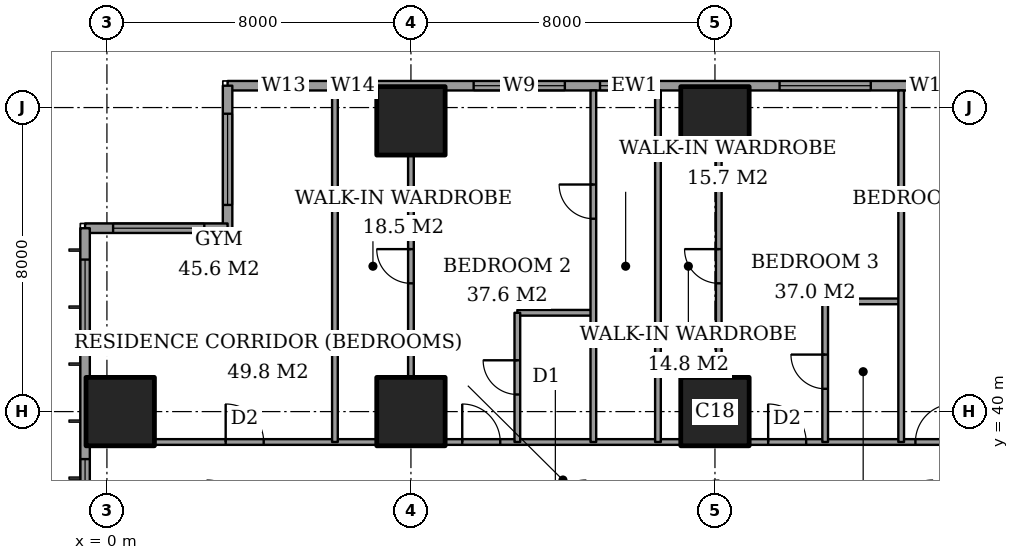
"""IFC4 building model, lengths in metres.
Left out: names, types, materials, properties, quantities, classifications, styles, units other than length and angle.
Written with IfcOpenShell. Run it as: python <this file> out.ifc"""

import sys

from ifc_helpers import new_model, si_unit, direction, frame, frame_2d, origin, origin_2d, place, context, subcontext, project, spatial, rectangle, extrude, element, fill, save


model = new_model("IFC4")
c1 = context("Model", 3, precision=1e-05, world=origin(), true_north=direction((0.0, 1.0)))
c2 = subcontext(c1, "Body", "Model", "MODEL_VIEW")
j1 = project(units=[si_unit("LENGTHUNIT", "METRE"), si_unit("PLANEANGLEUNIT", "RADIAN")], contexts=[c1])
p1 = place(None, origin())
s1 = spatial("IfcSite", under=j1, at=p1, CompositionType="ELEMENT")
p2 = place(p1, origin())
s2 = spatial("IfcBuilding", under=s1, at=p2, CompositionType="ELEMENT")
p3 = place(p2, frame((0.0, 0.0, 207.4)))
s3 = spatial("IfcBuildingStorey", under=s2, at=p3, CompositionType="ELEMENT", Elevation=207.4)
for number, where, z_axis, x_axis in (
    (1, (0.35, 40.0, 0.0), (0.0, 0.0, 1.0), (1.0, 0.0, 0.0)),
    (2, (8.0, 40.0, 0.0), (0.0, 0.0, 1.0), (1.0, 0.0, 0.0)),
    (3, (8.0, 47.65, 0.0), (0.0, 0.0, 1.0), (1.0, 0.0, 0.0)),
    (4, (16.0, 40.0, 0.0), (0.0, 0.0, 1.0), (1.0, 0.0, 0.0)),
    (5, (16.0, 47.65, 0.0), (0.0, 0.0, 1.0), (1.0, 0.0, 0.0)),
):
    element("IfcColumn", number, at=place(p3, frame(where, z_axis=z_axis, x_axis=x_axis)), inside=s3, PredefinedType="COLUMN", context=c2, shape_type="SweptSolid", body=[
        extrude(rectangle(XDim=1.8, YDim=1.8, at=origin_2d()), origin(), (0.0, 0.0, 1.0), 3.6),
    ])
p4 = place(p3, frame((24.575, 48.575, 0.0), z_axis=(0.0, 0.0, 1.0), x_axis=(-1.0, 0.0, 0.0)))
e6 = element("IfcWall", 6, at=p4, inside=s3, PredefinedType="SOLIDWALL", context=c2, shape_type="SweptSolid", body=[
    extrude(rectangle(XDim=21.4, YDim=0.25, at=frame_2d((10.7, 0.0))), origin(), (0.0, 0.0, 1.0), 3.6),
])
p5 = place(p4, frame((2.275, 0.0, 0.2)))
e7 = element("IfcOpeningElement", 7, at=p5, cuts=e6, PredefinedType="OPENING", context=c2, shape_type="SweptSolid", body=[
    extrude(rectangle(XDim=1.2, YDim=2.4, at=frame_2d((0.6, 1.2))), frame((0.0, 0.135, 0.0), z_axis=(0.0, -1.0, 0.0), x_axis=(1.0, 0.0, 0.0)), (0.0, 0.0, 1.0), 0.27),
])
p6 = place(p4, frame((4.475, 0.0, 0.2)))
e8 = element("IfcOpeningElement", 8, at=p6, cuts=e6, PredefinedType="OPENING", context=c2, shape_type="SweptSolid", body=[
    extrude(rectangle(XDim=2.4, YDim=2.4, at=frame_2d((1.2, 1.2))), frame((0.0, 0.135, 0.0), z_axis=(0.0, -1.0, 0.0), x_axis=(1.0, 0.0, 0.0)), (0.0, 0.0, 1.0), 0.27),
])
p7 = place(p4, frame((10.4, 0.0, 0.2)))
e9 = element("IfcOpeningElement", 9, at=p7, cuts=e6, PredefinedType="OPENING", context=c2, shape_type="SweptSolid", body=[
    extrude(rectangle(XDim=1.2, YDim=2.4, at=frame_2d((0.6, 1.2))), frame((0.0, 0.135, 0.0), z_axis=(0.0, -1.0, 0.0), x_axis=(1.0, 0.0, 0.0)), (0.0, 0.0, 1.0), 0.27),
])
p8 = place(p4, frame((12.525, 0.0, 0.2)))
e10 = element("IfcOpeningElement", 10, at=p8, cuts=e6, PredefinedType="OPENING", context=c2, shape_type="SweptSolid", body=[
    extrude(rectangle(XDim=2.4, YDim=2.4, at=frame_2d((1.2, 1.2))), frame((0.0, 0.135, 0.0), z_axis=(0.0, -1.0, 0.0), x_axis=(1.0, 0.0, 0.0)), (0.0, 0.0, 1.0), 0.27),
])
p9 = place(p4, frame((17.8, 0.0, 0.2)))
e11 = element("IfcOpeningElement", 11, at=p9, cuts=e6, PredefinedType="OPENING", context=c2, shape_type="SweptSolid", body=[
    extrude(rectangle(XDim=0.6, YDim=2.4, at=frame_2d((0.3, 1.2))), frame((0.0, 0.135, 0.0), z_axis=(0.0, -1.0, 0.0), x_axis=(1.0, 0.0, 0.0)), (0.0, 0.0, 1.0), 0.27),
])
p10 = place(p4, frame((19.325, 0.0, 0.2)))
e12 = element("IfcOpeningElement", 12, at=p10, cuts=e6, PredefinedType="OPENING", context=c2, shape_type="SweptSolid", body=[
    extrude(rectangle(XDim=1.2, YDim=2.4, at=frame_2d((0.6, 1.2))), frame((0.0, 0.135, 0.0), z_axis=(0.0, -1.0, 0.0), x_axis=(1.0, 0.0, 0.0)), (0.0, 0.0, 1.0), 0.27),
])
p11 = place(p3, frame((3.175, 48.575, 0.0), z_axis=(0.0, 0.0, 1.0), x_axis=(0.0, -1.0, 0.0)))
e13 = element("IfcWall", 13, at=p11, inside=s3, PredefinedType="SOLIDWALL", context=c2, shape_type="SweptSolid", body=[
    extrude(rectangle(XDim=3.75, YDim=0.25, at=frame_2d((1.875, 0.0))), origin(), (0.0, 0.0, 1.0), 3.6),
])
p12 = place(p11, frame((0.738, 0.0, 0.2)))
e14 = element("IfcOpeningElement", 14, at=p12, cuts=e13, PredefinedType="OPENING", context=c2, shape_type="SweptSolid", body=[
    extrude(rectangle(XDim=2.4, YDim=2.4, at=frame_2d((1.2, 1.2))), frame((0.0, 0.135, 0.0), z_axis=(0.0, -1.0, 0.0), x_axis=(1.0, 0.0, 0.0)), (0.0, 0.0, 1.0), 0.27),
])
p13 = place(p3, frame((3.175, 44.825, 0.0), z_axis=(0.0, 0.0, 1.0), x_axis=(-1.0, 0.0, 0.0)))
e15 = element("IfcWall", 15, at=p13, inside=s3, PredefinedType="SOLIDWALL", context=c2, shape_type="SweptSolid", body=[
    extrude(rectangle(XDim=3.75, YDim=0.25, at=frame_2d((1.875, 0.0))), origin(), (0.0, 0.0, 1.0), 3.6),
])
p14 = place(p13, frame((0.613, 0.0, 0.2)))
e16 = element("IfcOpeningElement", 16, at=p14, cuts=e15, PredefinedType="OPENING", context=c2, shape_type="SweptSolid", body=[
    extrude(rectangle(XDim=2.4, YDim=2.4, at=frame_2d((1.2, 1.2))), frame((0.0, 0.135, 0.0), z_axis=(0.0, -1.0, 0.0), x_axis=(1.0, 0.0, 0.0)), (0.0, 0.0, 1.0), 0.27),
])
p15 = place(p3, frame((-0.575, 44.825, 0.0), z_axis=(0.0, 0.0, 1.0), x_axis=(0.0, -1.0, 0.0)))
e17 = element("IfcWall", 17, at=p15, inside=s3, PredefinedType="SOLIDWALL", context=c2, shape_type="SweptSolid", body=[
    extrude(rectangle(XDim=41.65, YDim=0.25, at=frame_2d((20.825, 0.0))), origin(), (0.0, 0.0, 1.0), 3.6),
])
p16 = place(p15, frame((0.825, 0.0, 0.2)))
e18 = element("IfcOpeningElement", 18, at=p16, cuts=e17, PredefinedType="OPENING", context=c2, shape_type="SweptSolid", body=[
    extrude(rectangle(XDim=2.4, YDim=2.4, at=frame_2d((1.2, 1.2))), frame((0.0, 0.135, 0.0), z_axis=(0.0, -1.0, 0.0), x_axis=(1.0, 0.0, 0.0)), (0.0, 0.0, 1.0), 0.27),
])
p17 = place(p15, frame((6.075, 0.0, 0.2)))
e19 = element("IfcOpeningElement", 19, at=p17, cuts=e17, PredefinedType="OPENING", context=c2, shape_type="SweptSolid", body=[
    extrude(rectangle(XDim=1.2, YDim=2.4, at=frame_2d((0.6, 1.2))), frame((0.0, 0.135, 0.0), z_axis=(0.0, -1.0, 0.0), x_axis=(1.0, 0.0, 0.0)), (0.0, 0.0, 1.0), 0.27),
])
p18 = place(p15, frame((8.575, 0.0, 0.2)))
e20 = element("IfcOpeningElement", 20, at=p18, cuts=e17, PredefinedType="OPENING", context=c2, shape_type="SweptSolid", body=[
    extrude(rectangle(XDim=2.4, YDim=2.4, at=frame_2d((1.2, 1.2))), frame((0.0, 0.135, 0.0), z_axis=(0.0, -1.0, 0.0), x_axis=(1.0, 0.0, 0.0)), (0.0, 0.0, 1.0), 0.27),
])
p19 = place(p15, frame((15.675, 0.0, 0.2)))
e21 = element("IfcOpeningElement", 21, at=p19, cuts=e17, PredefinedType="OPENING", context=c2, shape_type="SweptSolid", body=[
    extrude(rectangle(XDim=2.4, YDim=2.4, at=frame_2d((1.2, 1.2))), frame((0.0, 0.135, 0.0), z_axis=(0.0, -1.0, 0.0), x_axis=(1.0, 0.0, 0.0)), (0.0, 0.0, 1.0), 0.27),
])
p20 = place(p15, frame((23.575, 0.0, 0.2)))
e22 = element("IfcOpeningElement", 22, at=p20, cuts=e17, PredefinedType="OPENING", context=c2, shape_type="SweptSolid", body=[
    extrude(rectangle(XDim=2.4, YDim=2.4, at=frame_2d((1.2, 1.2))), frame((0.0, 0.135, 0.0), z_axis=(0.0, -1.0, 0.0), x_axis=(1.0, 0.0, 0.0)), (0.0, 0.0, 1.0), 0.27),
])
p21 = place(p15, frame((30.775, 0.0, 0.2)))
e23 = element("IfcOpeningElement", 23, at=p21, cuts=e17, PredefinedType="OPENING", context=c2, shape_type="SweptSolid", body=[
    extrude(rectangle(XDim=2.4, YDim=2.4, at=frame_2d((1.2, 1.2))), frame((0.0, 0.135, 0.0), z_axis=(0.0, -1.0, 0.0), x_axis=(1.0, 0.0, 0.0)), (0.0, 0.0, 1.0), 0.27),
])
p22 = place(p15, frame((34.55, 0.0, 0.2)))
e24 = element("IfcOpeningElement", 24, at=p22, cuts=e17, PredefinedType="OPENING", context=c2, shape_type="SweptSolid", body=[
    extrude(rectangle(XDim=1.2, YDim=2.4, at=frame_2d((0.6, 1.2))), frame((0.0, 0.135, 0.0), z_axis=(0.0, -1.0, 0.0), x_axis=(1.0, 0.0, 0.0)), (0.0, 0.0, 1.0), 0.27),
])
p23 = place(p15, frame((38.425, 0.0, 0.2)))
e25 = element("IfcOpeningElement", 25, at=p23, cuts=e17, PredefinedType="OPENING", context=c2, shape_type="SweptSolid", body=[
    extrude(rectangle(XDim=2.4, YDim=2.4, at=frame_2d((1.2, 1.2))), frame((0.0, 0.135, 0.0), z_axis=(0.0, -1.0, 0.0), x_axis=(1.0, 0.0, 0.0)), (0.0, 0.0, 1.0), 0.27),
])
p24 = place(p3, frame((1.25, 39.2, 0.0), z_axis=(0.0, 0.0, 1.0), x_axis=(1.0, 0.0, 0.0)))
e26 = element("IfcWall", 26, at=p24, inside=s3, PredefinedType="PARTITIONING", context=c2, shape_type="SweptSolid", body=[
    extrude(rectangle(XDim=5.85, YDim=0.15, at=frame_2d((2.925, 0.0))), origin(), (0.0, 0.0, 1.0), 3.35),
])
p25 = place(p24, frame((1.875, 0.0, 0.0)))
e27 = element("IfcOpeningElement", 27, at=p25, cuts=e26, PredefinedType="OPENING", context=c2, shape_type="SweptSolid", body=[
    extrude(rectangle(XDim=1.0, YDim=2.1, at=frame_2d((0.5, 1.05))), frame((0.0, 0.085, 0.0), z_axis=(0.0, -1.0, 0.0), x_axis=(1.0, 0.0, 0.0)), (0.0, 0.0, 1.0), 0.17),
])
p26 = place(p3, frame((8.9, 39.2, 0.0), z_axis=(0.0, 0.0, 1.0), x_axis=(1.0, 0.0, 0.0)))
e28 = element("IfcWall", 28, at=p26, inside=s3, PredefinedType="PARTITIONING", context=c2, shape_type="SweptSolid", body=[
    extrude(rectangle(XDim=6.2, YDim=0.15, at=frame_2d((3.1, 0.0))), origin(), (0.0, 0.0, 1.0), 3.35),
])
p27 = place(p26, frame((0.45, 0.0, 0.0)))
e29 = element("IfcOpeningElement", 29, at=p27, cuts=e28, PredefinedType="OPENING", context=c2, shape_type="SweptSolid", body=[
    extrude(rectangle(XDim=1.0, YDim=2.1, at=frame_2d((0.5, 1.05))), frame((0.0, 0.085, 0.0), z_axis=(0.0, -1.0, 0.0), x_axis=(1.0, 0.0, 0.0)), (0.0, 0.0, 1.0), 0.17),
])
p28 = place(p3, frame((16.9, 39.2, 0.0), z_axis=(0.0, 0.0, 1.0), x_axis=(1.0, 0.0, 0.0)))
e30 = element("IfcWall", 30, at=p28, inside=s3, PredefinedType="PARTITIONING", context=c2, shape_type="SweptSolid", body=[
    extrude(rectangle(XDim=5.75, YDim=0.15, at=frame_2d((2.875, 0.0))), origin(), (0.0, 0.0, 1.0), 3.35),
])
p29 = place(p28, frame((0.5, 0.0, 0.0)))
e31 = element("IfcOpeningElement", 31, at=p29, cuts=e30, PredefinedType="OPENING", context=c2, shape_type="SweptSolid", body=[
    extrude(rectangle(XDim=1.0, YDim=2.1, at=frame_2d((0.5, 1.05))), frame((0.0, 0.085, 0.0), z_axis=(0.0, -1.0, 0.0), x_axis=(1.0, 0.0, 0.0)), (0.0, 0.0, 1.0), 0.17),
])
p30 = place(p28, frame((4.375, 0.0, 0.0)))
e32 = element("IfcOpeningElement", 32, at=p30, cuts=e30, PredefinedType="OPENING", context=c2, shape_type="SweptSolid", body=[
    extrude(rectangle(XDim=1.0, YDim=2.1, at=frame_2d((0.5, 1.05))), frame((0.0, 0.085, 0.0), z_axis=(0.0, -1.0, 0.0), x_axis=(1.0, 0.0, 0.0)), (0.0, 0.0, 1.0), 0.17),
])
for number, where, z_axis, x_axis in (
    (33, (10.8, 42.6, 0.0), (0.0, 0.0, 1.0), (1.0, 0.0, 0.0)),
    (34, (18.9, 42.9, 0.0), (0.0, 0.0, 1.0), (1.0, 0.0, 0.0)),
):
    element("IfcWall", number, at=place(p3, frame(where, z_axis=z_axis, x_axis=x_axis)), inside=s3, PredefinedType="PARTITIONING", context=c2, shape_type="SweptSolid", body=[
        extrude(rectangle(XDim=2.0, YDim=0.15, at=frame_2d((1.0, 0.0))), origin(), (0.0, 0.0, 1.0), 3.35),
    ])
p31 = place(p3, frame((6.0, 39.2, 0.0), z_axis=(0.0, 0.0, 1.0), x_axis=(0.0, 1.0, 0.0)))
e35 = element("IfcWall", 35, at=p31, inside=s3, PredefinedType="PARTITIONING", context=c2, shape_type="SweptSolid", body=[
    extrude(rectangle(XDim=9.25, YDim=0.15, at=frame_2d((4.625, 0.0))), origin(), (0.0, 0.0, 1.0), 3.35),
])
p32 = place(p3, frame((8.0, 40.9, 0.0), z_axis=(0.0, 0.0, 1.0), x_axis=(0.0, 1.0, 0.0)))
e36 = element("IfcWall", 36, at=p32, inside=s3, PredefinedType="PARTITIONING", context=c2, shape_type="SweptSolid", body=[
    extrude(rectangle(XDim=5.85, YDim=0.15, at=frame_2d((2.925, 0.0))), origin(), (0.0, 0.0, 1.0), 3.35),
])
p33 = place(p32, frame((2.475, 0.0, 0.0)))
e37 = element("IfcOpeningElement", 37, at=p33, cuts=e36, PredefinedType="OPENING", context=c2, shape_type="SweptSolid", body=[
    extrude(rectangle(XDim=0.9, YDim=2.1, at=frame_2d((0.45, 1.05))), frame((0.0, 0.085, 0.0), z_axis=(0.0, -1.0, 0.0), x_axis=(1.0, 0.0, 0.0)), (0.0, 0.0, 1.0), 0.17),
])
p34 = place(p3, frame((10.8, 39.2, 0.0), z_axis=(0.0, 0.0, 1.0), x_axis=(0.0, 1.0, 0.0)))
e38 = element("IfcWall", 38, at=p34, inside=s3, PredefinedType="PARTITIONING", context=c2, shape_type="SweptSolid", body=[
    extrude(rectangle(XDim=3.4, YDim=0.15, at=frame_2d((1.7, 0.0))), origin(), (0.0, 0.0, 1.0), 3.35),
])
p35 = place(p34, frame((1.25, 0.0, 0.0)))
e39 = element("IfcOpeningElement", 39, at=p35, cuts=e38, PredefinedType="OPENING", context=c2, shape_type="SweptSolid", body=[
    extrude(rectangle(XDim=0.9, YDim=2.1, at=frame_2d((0.45, 1.05))), frame((0.0, 0.085, 0.0), z_axis=(0.0, -1.0, 0.0), x_axis=(1.0, 0.0, 0.0)), (0.0, 0.0, 1.0), 0.17),
])
p36 = place(p3, frame((12.8, 39.2, 0.0), z_axis=(0.0, 0.0, 1.0), x_axis=(0.0, 1.0, 0.0)))
e40 = element("IfcWall", 40, at=p36, inside=s3, PredefinedType="PARTITIONING", context=c2, shape_type="SweptSolid", body=[
    extrude(rectangle(XDim=9.25, YDim=0.15, at=frame_2d((4.625, 0.0))), origin(), (0.0, 0.0, 1.0), 3.35),
])
p37 = place(p36, frame((5.875, 0.0, 0.0)))
e41 = element("IfcOpeningElement", 41, at=p37, cuts=e40, PredefinedType="OPENING", context=c2, shape_type="SweptSolid", body=[
    extrude(rectangle(XDim=0.9, YDim=2.1, at=frame_2d((0.45, 1.05))), frame((0.0, 0.085, 0.0), z_axis=(0.0, -1.0, 0.0), x_axis=(1.0, 0.0, 0.0)), (0.0, 0.0, 1.0), 0.17),
])
p38 = place(p3, frame((14.5, 39.2, 0.0), z_axis=(0.0, 0.0, 1.0), x_axis=(0.0, 1.0, 0.0)))
e42 = element("IfcWall", 42, at=p38, inside=s3, PredefinedType="PARTITIONING", context=c2, shape_type="SweptSolid", body=[
    extrude(rectangle(XDim=9.25, YDim=0.15, at=frame_2d((4.625, 0.0))), origin(), (0.0, 0.0, 1.0), 3.35),
])
p39 = place(p3, frame((16.1, 40.9, 0.0), z_axis=(0.0, 0.0, 1.0), x_axis=(0.0, 1.0, 0.0)))
e43 = element("IfcWall", 43, at=p39, inside=s3, PredefinedType="PARTITIONING", context=c2, shape_type="SweptSolid", body=[
    extrude(rectangle(XDim=5.85, YDim=0.15, at=frame_2d((2.925, 0.0))), origin(), (0.0, 0.0, 1.0), 3.35),
])
p40 = place(p39, frame((2.475, 0.0, 0.0)))
e44 = element("IfcOpeningElement", 44, at=p40, cuts=e43, PredefinedType="OPENING", context=c2, shape_type="SweptSolid", body=[
    extrude(rectangle(XDim=0.9, YDim=2.1, at=frame_2d((0.45, 1.05))), frame((0.0, 0.085, 0.0), z_axis=(0.0, -1.0, 0.0), x_axis=(1.0, 0.0, 0.0)), (0.0, 0.0, 1.0), 0.17),
])
p41 = place(p3, frame((18.9, 39.2, 0.0), z_axis=(0.0, 0.0, 1.0), x_axis=(0.0, 1.0, 0.0)))
e45 = element("IfcWall", 45, at=p41, inside=s3, PredefinedType="PARTITIONING", context=c2, shape_type="SweptSolid", body=[
    extrude(rectangle(XDim=3.7, YDim=0.15, at=frame_2d((1.85, 0.0))), origin(), (0.0, 0.0, 1.0), 3.35),
])
p42 = place(p41, frame((1.4, 0.0, 0.0)))
e46 = element("IfcOpeningElement", 46, at=p42, cuts=e45, PredefinedType="OPENING", context=c2, shape_type="SweptSolid", body=[
    extrude(rectangle(XDim=0.9, YDim=2.1, at=frame_2d((0.45, 1.05))), frame((0.0, 0.085, 0.0), z_axis=(0.0, -1.0, 0.0), x_axis=(1.0, 0.0, 0.0)), (0.0, 0.0, 1.0), 0.17),
])
p43 = place(p3, frame((20.9, 39.2, 0.0), z_axis=(0.0, 0.0, 1.0), x_axis=(0.0, 1.0, 0.0)))
e47 = element("IfcWall", 47, at=p43, inside=s3, PredefinedType="PARTITIONING", context=c2, shape_type="SweptSolid", body=[
    extrude(rectangle(XDim=9.25, YDim=0.15, at=frame_2d((4.625, 0.0))), origin(), (0.0, 0.0, 1.0), 3.35),
])
p44 = place(p5, origin())
e48 = element("IfcWindow", 48, at=p44, inside=s3, PartitioningType="SINGLE_PANEL", PredefinedType="WINDOW", context=c2, shape_type="SweptSolid", body=[
    extrude(rectangle(XDim=1.2, YDim=2.4, at=frame_2d((0.6, 1.2))), frame((0.0, 0.03, 0.0), z_axis=(0.0, -1.0, 0.0), x_axis=(1.0, 0.0, 0.0)), (0.0, 0.0, 1.0), 0.06),
])
fill(e7, e48)
p45 = place(p6, origin())
e49 = element("IfcWindow", 49, at=p45, inside=s3, PartitioningType="SINGLE_PANEL", PredefinedType="WINDOW", context=c2, shape_type="SweptSolid", body=[
    extrude(rectangle(XDim=2.4, YDim=2.4, at=frame_2d((1.2, 1.2))), frame((0.0, 0.03, 0.0), z_axis=(0.0, -1.0, 0.0), x_axis=(1.0, 0.0, 0.0)), (0.0, 0.0, 1.0), 0.06),
])
fill(e8, e49)
p46 = place(p7, origin())
e50 = element("IfcWindow", 50, at=p46, inside=s3, PartitioningType="SINGLE_PANEL", PredefinedType="WINDOW", context=c2, shape_type="SweptSolid", body=[
    extrude(rectangle(XDim=1.2, YDim=2.4, at=frame_2d((0.6, 1.2))), frame((0.0, 0.03, 0.0), z_axis=(0.0, -1.0, 0.0), x_axis=(1.0, 0.0, 0.0)), (0.0, 0.0, 1.0), 0.06),
])
fill(e9, e50)
p47 = place(p8, origin())
e51 = element("IfcWindow", 51, at=p47, inside=s3, PartitioningType="SINGLE_PANEL", PredefinedType="WINDOW", context=c2, shape_type="SweptSolid", body=[
    extrude(rectangle(XDim=2.4, YDim=2.4, at=frame_2d((1.2, 1.2))), frame((0.0, 0.03, 0.0), z_axis=(0.0, -1.0, 0.0), x_axis=(1.0, 0.0, 0.0)), (0.0, 0.0, 1.0), 0.06),
])
fill(e10, e51)
p48 = place(p9, origin())
e52 = element("IfcWindow", 52, at=p48, inside=s3, PartitioningType="SINGLE_PANEL", PredefinedType="WINDOW", context=c2, shape_type="SweptSolid", body=[
    extrude(rectangle(XDim=0.6, YDim=2.4, at=frame_2d((0.3, 1.2))), frame((0.0, 0.03, 0.0), z_axis=(0.0, -1.0, 0.0), x_axis=(1.0, 0.0, 0.0)), (0.0, 0.0, 1.0), 0.06),
])
fill(e11, e52)
p49 = place(p10, origin())
e53 = element("IfcWindow", 53, at=p49, inside=s3, PartitioningType="SINGLE_PANEL", PredefinedType="WINDOW", context=c2, shape_type="SweptSolid", body=[
    extrude(rectangle(XDim=1.2, YDim=2.4, at=frame_2d((0.6, 1.2))), frame((0.0, 0.03, 0.0), z_axis=(0.0, -1.0, 0.0), x_axis=(1.0, 0.0, 0.0)), (0.0, 0.0, 1.0), 0.06),
])
fill(e12, e53)
p50 = place(p12, origin())
e54 = element("IfcWindow", 54, at=p50, inside=s3, PartitioningType="SINGLE_PANEL", PredefinedType="WINDOW", context=c2, shape_type="SweptSolid", body=[
    extrude(rectangle(XDim=2.4, YDim=2.4, at=frame_2d((1.2, 1.2))), frame((0.0, 0.03, 0.0), z_axis=(0.0, -1.0, 0.0), x_axis=(1.0, 0.0, 0.0)), (0.0, 0.0, 1.0), 0.06),
])
fill(e14, e54)
p51 = place(p14, origin())
e55 = element("IfcWindow", 55, at=p51, inside=s3, PartitioningType="SINGLE_PANEL", PredefinedType="WINDOW", context=c2, shape_type="SweptSolid", body=[
    extrude(rectangle(XDim=2.4, YDim=2.4, at=frame_2d((1.2, 1.2))), frame((0.0, 0.03, 0.0), z_axis=(0.0, -1.0, 0.0), x_axis=(1.0, 0.0, 0.0)), (0.0, 0.0, 1.0), 0.06),
])
fill(e16, e55)
p52 = place(p16, origin())
e56 = element("IfcWindow", 56, at=p52, inside=s3, PartitioningType="SINGLE_PANEL", PredefinedType="WINDOW", context=c2, shape_type="SweptSolid", body=[
    extrude(rectangle(XDim=2.4, YDim=2.4, at=frame_2d((1.2, 1.2))), frame((0.0, 0.03, 0.0), z_axis=(0.0, -1.0, 0.0), x_axis=(1.0, 0.0, 0.0)), (0.0, 0.0, 1.0), 0.06),
])
fill(e18, e56)
p53 = place(p17, origin())
e57 = element("IfcWindow", 57, at=p53, inside=s3, PartitioningType="SINGLE_PANEL", PredefinedType="WINDOW", context=c2, shape_type="SweptSolid", body=[
    extrude(rectangle(XDim=1.2, YDim=2.4, at=frame_2d((0.6, 1.2))), frame((0.0, 0.03, 0.0), z_axis=(0.0, -1.0, 0.0), x_axis=(1.0, 0.0, 0.0)), (0.0, 0.0, 1.0), 0.06),
])
fill(e19, e57)
p54 = place(p25, origin())
e58 = element("IfcDoor", 58, at=p54, inside=s3, OperationType="SINGLE_SWING_RIGHT", PredefinedType="DOOR", context=c2, shape_type="SweptSolid", body=[
    extrude(rectangle(XDim=1.0, YDim=2.1, at=frame_2d((0.5, 1.05))), frame((0.0, 0.025, 0.0), z_axis=(0.0, -1.0, 0.0), x_axis=(1.0, 0.0, 0.0)), (0.0, 0.0, 1.0), 0.05),
])
fill(e27, e58)
p55 = place(p33, origin())
e59 = element("IfcDoor", 59, at=p55, inside=s3, OperationType="SINGLE_SWING_LEFT", PredefinedType="DOOR", context=c2, shape_type="SweptSolid", body=[
    extrude(rectangle(XDim=0.9, YDim=2.1, at=frame_2d((0.45, 1.05))), frame((0.0, 0.025, 0.0), z_axis=(0.0, -1.0, 0.0), x_axis=(1.0, 0.0, 0.0)), (0.0, 0.0, 1.0), 0.05),
])
fill(e37, e59)
p56 = place(p35, origin())
e60 = element("IfcDoor", 60, at=p56, inside=s3, OperationType="SINGLE_SWING_LEFT", PredefinedType="DOOR", context=c2, shape_type="SweptSolid", body=[
    extrude(rectangle(XDim=0.9, YDim=2.1, at=frame_2d((0.45, 1.05))), frame((0.0, 0.025, 0.0), z_axis=(0.0, -1.0, 0.0), x_axis=(1.0, 0.0, 0.0)), (0.0, 0.0, 1.0), 0.05),
])
fill(e39, e60)
p57 = place(p27, origin())
e61 = element("IfcDoor", 61, at=p57, inside=s3, OperationType="SINGLE_SWING_RIGHT", PredefinedType="DOOR", context=c2, shape_type="SweptSolid", body=[
    extrude(rectangle(XDim=1.0, YDim=2.1, at=frame_2d((0.5, 1.05))), frame((0.0, 0.025, 0.0), z_axis=(0.0, -1.0, 0.0), x_axis=(1.0, 0.0, 0.0)), (0.0, 0.0, 1.0), 0.05),
])
fill(e29, e61)
p58 = place(p37, origin())
e62 = element("IfcDoor", 62, at=p58, inside=s3, OperationType="SINGLE_SWING_LEFT", PredefinedType="DOOR", context=c2, shape_type="SweptSolid", body=[
    extrude(rectangle(XDim=0.9, YDim=2.1, at=frame_2d((0.45, 1.05))), frame((0.0, 0.025, 0.0), z_axis=(0.0, -1.0, 0.0), x_axis=(1.0, 0.0, 0.0)), (0.0, 0.0, 1.0), 0.05),
])
fill(e41, e62)
p59 = place(p40, origin())
e63 = element("IfcDoor", 63, at=p59, inside=s3, OperationType="SINGLE_SWING_LEFT", PredefinedType="DOOR", context=c2, shape_type="SweptSolid", body=[
    extrude(rectangle(XDim=0.9, YDim=2.1, at=frame_2d((0.45, 1.05))), frame((0.0, 0.025, 0.0), z_axis=(0.0, -1.0, 0.0), x_axis=(1.0, 0.0, 0.0)), (0.0, 0.0, 1.0), 0.05),
])
fill(e44, e63)
p60 = place(p42, origin())
e64 = element("IfcDoor", 64, at=p60, inside=s3, OperationType="SINGLE_SWING_LEFT", PredefinedType="DOOR", context=c2, shape_type="SweptSolid", body=[
    extrude(rectangle(XDim=0.9, YDim=2.1, at=frame_2d((0.45, 1.05))), frame((0.0, 0.025, 0.0), z_axis=(0.0, -1.0, 0.0), x_axis=(1.0, 0.0, 0.0)), (0.0, 0.0, 1.0), 0.05),
])
fill(e46, e64)
p61 = place(p29, origin())
e65 = element("IfcDoor", 65, at=p61, inside=s3, OperationType="SINGLE_SWING_RIGHT", PredefinedType="DOOR", context=c2, shape_type="SweptSolid", body=[
    extrude(rectangle(XDim=1.0, YDim=2.1, at=frame_2d((0.5, 1.05))), frame((0.0, 0.025, 0.0), z_axis=(0.0, -1.0, 0.0), x_axis=(1.0, 0.0, 0.0)), (0.0, 0.0, 1.0), 0.05),
])
fill(e31, e65)
p62 = place(p30, origin())
e66 = element("IfcDoor", 66, at=p62, inside=s3, OperationType="SINGLE_SWING_LEFT", PredefinedType="DOOR", context=c2, shape_type="SweptSolid", body=[
    extrude(rectangle(XDim=1.0, YDim=2.1, at=frame_2d((0.5, 1.05))), frame((0.0, 0.025, 0.0), z_axis=(0.0, -1.0, 0.0), x_axis=(1.0, 0.0, 0.0)), (0.0, 0.0, 1.0), 0.05),
])
fill(e32, e66)
save(model, sys.argv[1])
